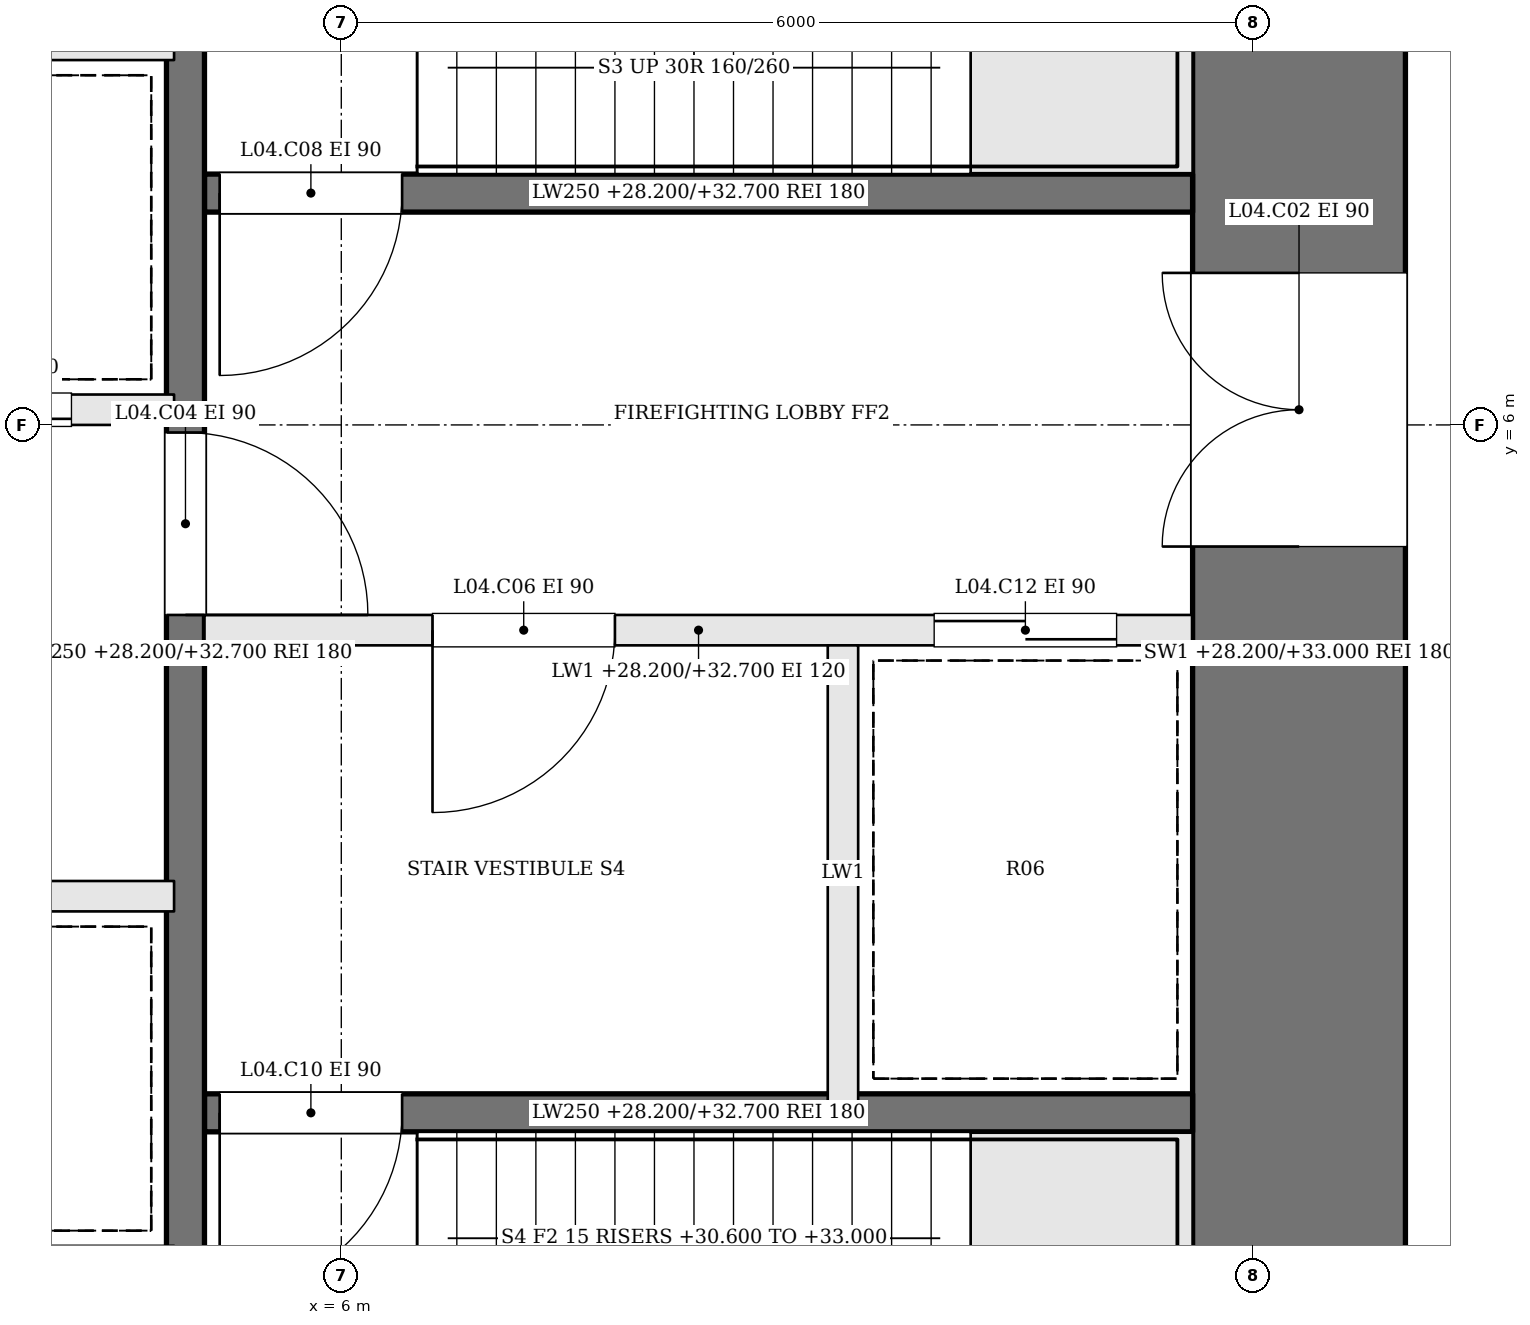
"""IFC4 building model, lengths in metres.
Left out: names, types, materials, properties, quantities, classifications, styles, units other than length and angle.
Written with IfcOpenShell. Run it as: python <this file> out.ifc"""

import sys

from ifc_helpers import new_model, si_unit, direction, frame, frame_2d, origin, place, context, subcontext, project, spatial, rectangle, extrude, element, fill, save


model = new_model("IFC4")
c1 = context("Model", 3, precision=1e-05, world=origin(), true_north=direction((0.0, 1.0)))
c2 = subcontext(c1, "Body", "Model", "MODEL_VIEW")
j1 = project(units=[si_unit("LENGTHUNIT", "METRE"), si_unit("PLANEANGLEUNIT", "RADIAN")], contexts=[c1])
p1 = place(None, origin())
s1 = spatial("IfcSite", under=j1, at=p1, CompositionType="ELEMENT")
p2 = place(p1, origin())
s2 = spatial("IfcBuilding", under=s1, at=p2, CompositionType="ELEMENT")
p3 = place(p2, frame((0.0, 0.0, 28.2)))
s3 = spatial("IfcBuildingStorey", under=s2, at=p3, CompositionType="ELEMENT", Elevation=28.2)
p4 = place(p3, frame((12.3, -1.6, 0.0), z_axis=(0.0, 0.0, 1.0), x_axis=(0.0, 1.0, 0.0)))
e1 = element("IfcWall", 1, at=p4, inside=s3, PredefinedType="SHEAR", context=c2, shape_type="SweptSolid", body=[
    extrude(rectangle(XDim=12.2, YDim=1.4, at=frame_2d((6.1, 0.0))), origin(), (0.0, 0.0, 1.0), 4.8),
])
p5 = place(p4, frame((6.8, 0.0, 0.0)))
e2 = element("IfcOpeningElement", 2, at=p5, cuts=e1, PredefinedType="OPENING", context=c2, shape_type="SweptSolid", body=[
    extrude(rectangle(XDim=1.8, YDim=2.1, at=frame_2d((0.9, 1.05))), frame((0.0, 0.71, 0.0), z_axis=(0.0, -1.0, 0.0), x_axis=(1.0, 0.0, 0.0)), (0.0, 0.0, 1.0), 1.42),
])
p6 = place(p3, frame((11.6, 7.525, 0.0), z_axis=(0.0, 0.0, 1.0), x_axis=(-1.0, 0.0, 0.0)))
e3 = element("IfcWall", 3, at=p6, inside=s3, PredefinedType="SOLIDWALL", context=c2, shape_type="SweptSolid", body=[
    extrude(rectangle(XDim=6.5, YDim=0.25, at=frame_2d((3.25, 0.0))), origin(), (0.0, 0.0, 1.0), 4.5),
])
p7 = place(p6, frame((5.2, 0.0, 0.0)))
e4 = element("IfcOpeningElement", 4, at=p7, cuts=e3, PredefinedType="OPENING", context=c2, shape_type="SweptSolid", body=[
    extrude(rectangle(XDim=1.2, YDim=2.1, at=frame_2d((0.6, 1.05))), frame((0.0, 0.135, 0.0), z_axis=(0.0, -1.0, 0.0), x_axis=(1.0, 0.0, 0.0)), (0.0, 0.0, 1.0), 0.27),
])
p8 = place(p3, frame((11.6, 4.65, 0.0), z_axis=(0.0, 0.0, 1.0), x_axis=(-1.0, 0.0, 0.0)))
e5 = element("IfcWall", 5, at=p8, inside=s3, PredefinedType="SOLIDWALL", context=c2, shape_type="SweptSolid", body=[
    extrude(rectangle(XDim=6.5, YDim=0.2, at=frame_2d((3.25, 0.0))), origin(), (0.0, 0.0, 1.0), 4.5),
])
p9 = place(p8, frame((3.8, 0.0, 0.0)))
e6 = element("IfcOpeningElement", 6, at=p9, cuts=e5, PredefinedType="OPENING", context=c2, shape_type="SweptSolid", body=[
    extrude(rectangle(XDim=1.2, YDim=2.1, at=frame_2d((0.6, 1.05))), frame((0.0, 0.11, 0.0), z_axis=(0.0, -1.0, 0.0), x_axis=(1.0, 0.0, 0.0)), (0.0, 0.0, 1.0), 0.22),
])
p10 = place(p8, frame((0.5, 0.0, 0.0)))
e7 = element("IfcOpeningElement", 7, at=p10, cuts=e5, PredefinedType="OPENING", context=c2, shape_type="SweptSolid", body=[
    extrude(rectangle(XDim=1.2, YDim=2.1, at=frame_2d((0.6, 1.05))), frame((0.0, 0.11, 0.0), z_axis=(0.0, -1.0, 0.0), x_axis=(1.0, 0.0, 0.0)), (0.0, 0.0, 1.0), 0.22),
])
p11 = place(p3, frame((11.6, 1.475, 0.0), z_axis=(0.0, 0.0, 1.0), x_axis=(-1.0, 0.0, 0.0)))
e8 = element("IfcWall", 8, at=p11, inside=s3, PredefinedType="SOLIDWALL", context=c2, shape_type="SweptSolid", body=[
    extrude(rectangle(XDim=6.5, YDim=0.25, at=frame_2d((3.25, 0.0))), origin(), (0.0, 0.0, 1.0), 4.5),
])
p12 = place(p11, frame((5.2, 0.0, 0.0)))
e9 = element("IfcOpeningElement", 9, at=p12, cuts=e8, PredefinedType="OPENING", context=c2, shape_type="SweptSolid", body=[
    extrude(rectangle(XDim=1.2, YDim=2.1, at=frame_2d((0.6, 1.05))), frame((0.0, 0.135, 0.0), z_axis=(0.0, -1.0, 0.0), x_axis=(1.0, 0.0, 0.0)), (0.0, 0.0, 1.0), 0.27),
])
p13 = place(p3, frame((9.3, 4.55, 0.0), z_axis=(0.0, 0.0, 1.0), x_axis=(0.0, -1.0, 0.0)))
e10 = element("IfcWall", 10, at=p13, inside=s3, PredefinedType="SOLIDWALL", context=c2, shape_type="SweptSolid", body=[
    extrude(rectangle(XDim=3.0, YDim=0.2, at=frame_2d((1.5, 0.0))), origin(), (0.0, 0.0, 1.0), 4.5),
])
p14 = place(p3, frame((4.975, 10.6, 0.0), z_axis=(0.0, 0.0, 1.0), x_axis=(0.0, -1.0, 0.0)))
e11 = element("IfcWall", 11, at=p14, inside=s3, PredefinedType="SOLIDWALL", context=c2, shape_type="SweptSolid", body=[
    extrude(rectangle(XDim=12.2, YDim=0.25, at=frame_2d((6.1, 0.0))), origin(), (0.0, 0.0, 1.0), 4.5),
])
p15 = place(p14, frame((4.65, 0.0, 0.0)))
e12 = element("IfcOpeningElement", 12, at=p15, cuts=e11, PredefinedType="OPENING", context=c2, shape_type="SweptSolid", body=[
    extrude(rectangle(XDim=1.2, YDim=2.1, at=frame_2d((0.6, 1.05))), frame((0.0, 0.135, 0.0), z_axis=(0.0, -1.0, 0.0), x_axis=(1.0, 0.0, 0.0)), (0.0, 0.0, 1.0), 0.27),
])
p16 = place(p3, frame((-4.9, 2.9, 0.0), z_axis=(0.0, 0.0, 1.0), x_axis=(1.0, 0.0, 0.0)))
e13 = element("IfcWall", 13, at=p16, inside=s3, PredefinedType="SOLIDWALL", context=c2, shape_type="SweptSolid", body=[
    extrude(rectangle(XDim=9.8, YDim=0.2, at=frame_2d((4.9, 0.0))), origin(), (0.0, 0.0, 1.0), 4.5),
])
p17 = place(p16, frame((0.675, 0.0, 0.0)))
e14 = element("IfcOpeningElement", 14, at=p17, cuts=e13, PredefinedType="OPENING", context=c2, shape_type="SweptSolid", body=[
    extrude(rectangle(XDim=1.1, YDim=2.1, at=frame_2d((0.55, 1.05))), frame((0.0, 0.11, 0.0), z_axis=(0.0, -1.0, 0.0), x_axis=(1.0, 0.0, 0.0)), (0.0, 0.0, 1.0), 0.22),
])
p18 = place(p16, frame((3.125, 0.0, 0.0)))
e15 = element("IfcOpeningElement", 15, at=p18, cuts=e13, PredefinedType="OPENING", context=c2, shape_type="SweptSolid", body=[
    extrude(rectangle(XDim=1.1, YDim=2.1, at=frame_2d((0.55, 1.05))), frame((0.0, 0.11, 0.0), z_axis=(0.0, -1.0, 0.0), x_axis=(1.0, 0.0, 0.0)), (0.0, 0.0, 1.0), 0.22),
])
p19 = place(p3, frame((-4.9, 6.1, 0.0), z_axis=(0.0, 0.0, 1.0), x_axis=(1.0, 0.0, 0.0)))
e16 = element("IfcWall", 16, at=p19, inside=s3, PredefinedType="SOLIDWALL", context=c2, shape_type="SweptSolid", body=[
    extrude(rectangle(XDim=9.8, YDim=0.2, at=frame_2d((4.9, 0.0))), origin(), (0.0, 0.0, 1.0), 4.5),
])
p20 = place(p19, frame((0.675, 0.0, 0.0)))
e17 = element("IfcOpeningElement", 17, at=p20, cuts=e16, PredefinedType="OPENING", context=c2, shape_type="SweptSolid", body=[
    extrude(rectangle(XDim=1.1, YDim=2.1, at=frame_2d((0.55, 1.05))), frame((0.0, 0.11, 0.0), z_axis=(0.0, -1.0, 0.0), x_axis=(1.0, 0.0, 0.0)), (0.0, 0.0, 1.0), 0.22),
])
p21 = place(p19, frame((3.125, 0.0, 0.0)))
e18 = element("IfcOpeningElement", 18, at=p21, cuts=e16, PredefinedType="OPENING", context=c2, shape_type="SweptSolid", body=[
    extrude(rectangle(XDim=1.1, YDim=2.1, at=frame_2d((0.55, 1.05))), frame((0.0, 0.11, 0.0), z_axis=(0.0, -1.0, 0.0), x_axis=(1.0, 0.0, 0.0)), (0.0, 0.0, 1.0), 0.22),
])
p22 = place(p19, frame((5.575, 0.0, 0.0)))
e19 = element("IfcOpeningElement", 19, at=p22, cuts=e16, PredefinedType="OPENING", context=c2, shape_type="SweptSolid", body=[
    extrude(rectangle(XDim=1.1, YDim=2.1, at=frame_2d((0.55, 1.05))), frame((0.0, 0.11, 0.0), z_axis=(0.0, -1.0, 0.0), x_axis=(1.0, 0.0, 0.0)), (0.0, 0.0, 1.0), 0.22),
])
p23 = place(p19, frame((8.025, 0.0, 0.0)))
e20 = element("IfcOpeningElement", 20, at=p23, cuts=e16, PredefinedType="OPENING", context=c2, shape_type="SweptSolid", body=[
    extrude(rectangle(XDim=1.1, YDim=2.1, at=frame_2d((0.55, 1.05))), frame((0.0, 0.11, 0.0), z_axis=(0.0, -1.0, 0.0), x_axis=(1.0, 0.0, 0.0)), (0.0, 0.0, 1.0), 0.22),
])
p24 = place(p3, frame((-4.9, 8.5, 0.0), z_axis=(0.0, 0.0, 1.0), x_axis=(1.0, 0.0, 0.0)))
e21 = element("IfcWall", 21, at=p24, inside=s3, PredefinedType="SOLIDWALL", context=c2, shape_type="SweptSolid", body=[
    extrude(rectangle(XDim=9.8, YDim=0.2, at=frame_2d((4.9, 0.0))), origin(), (0.0, 0.0, 1.0), 4.5),
])
p25 = place(p5, origin())
e22 = element("IfcDoor", 22, at=p25, inside=s3, OperationType="DOUBLE_DOOR_SINGLE_SWING", PredefinedType="DOOR", context=c2, shape_type="SweptSolid", body=[
    extrude(rectangle(XDim=1.8, YDim=2.1, at=frame_2d((0.9, 1.05))), frame((0.0, 0.025, 0.0), z_axis=(0.0, -1.0, 0.0), x_axis=(1.0, 0.0, 0.0)), (0.0, 0.0, 1.0), 0.05),
])
fill(e2, e22)
p26 = place(p15, origin())
e23 = element("IfcDoor", 23, at=p26, inside=s3, OperationType="SINGLE_SWING_RIGHT", PredefinedType="DOOR", context=c2, shape_type="SweptSolid", body=[
    extrude(rectangle(XDim=1.2, YDim=2.1, at=frame_2d((0.6, 1.05))), frame((0.0, 0.025, 0.0), z_axis=(0.0, -1.0, 0.0), x_axis=(1.0, 0.0, 0.0)), (0.0, 0.0, 1.0), 0.05),
])
fill(e12, e23)
p27 = place(p9, origin())
e24 = element("IfcDoor", 24, at=p27, inside=s3, OperationType="SINGLE_SWING_RIGHT", PredefinedType="DOOR", context=c2, shape_type="SweptSolid", body=[
    extrude(rectangle(XDim=1.2, YDim=2.1, at=frame_2d((0.6, 1.05))), frame((0.0, 0.025, 0.0), z_axis=(0.0, -1.0, 0.0), x_axis=(1.0, 0.0, 0.0)), (0.0, 0.0, 1.0), 0.05),
])
fill(e6, e24)
p28 = place(p7, origin())
e25 = element("IfcDoor", 25, at=p28, inside=s3, OperationType="SINGLE_SWING_RIGHT", PredefinedType="DOOR", context=c2, shape_type="SweptSolid", body=[
    extrude(rectangle(XDim=1.2, YDim=2.1, at=frame_2d((0.6, 1.05))), frame((0.0, 0.025, 0.0), z_axis=(0.0, -1.0, 0.0), x_axis=(1.0, 0.0, 0.0)), (0.0, 0.0, 1.0), 0.05),
])
fill(e4, e25)
p29 = place(p12, origin())
e26 = element("IfcDoor", 26, at=p29, inside=s3, OperationType="SINGLE_SWING_RIGHT", PredefinedType="DOOR", context=c2, shape_type="SweptSolid", body=[
    extrude(rectangle(XDim=1.2, YDim=2.1, at=frame_2d((0.6, 1.05))), frame((0.0, 0.025, 0.0), z_axis=(0.0, -1.0, 0.0), x_axis=(1.0, 0.0, 0.0)), (0.0, 0.0, 1.0), 0.05),
])
fill(e9, e26)
p30 = place(p10, origin())
e27 = element("IfcDoor", 27, at=p30, inside=s3, OperationType="SLIDING_TO_RIGHT", PredefinedType="DOOR", context=c2, shape_type="SweptSolid", body=[
    extrude(rectangle(XDim=1.2, YDim=2.1, at=frame_2d((0.6, 1.05))), frame((0.0, 0.025, 0.0), z_axis=(0.0, -1.0, 0.0), x_axis=(1.0, 0.0, 0.0)), (0.0, 0.0, 1.0), 0.05),
])
fill(e7, e27)
p31 = place(p23, origin())
e28 = element("IfcDoor", 28, at=p31, inside=s3, OperationType="SLIDING_TO_LEFT", PredefinedType="DOOR", context=c2, shape_type="SweptSolid", body=[
    extrude(rectangle(XDim=1.1, YDim=2.1, at=frame_2d((0.55, 1.05))), frame((0.0, 0.025, 0.0), z_axis=(0.0, -1.0, 0.0), x_axis=(1.0, 0.0, 0.0)), (0.0, 0.0, 1.0), 0.05),
])
fill(e20, e28)
save(model, sys.argv[1])
